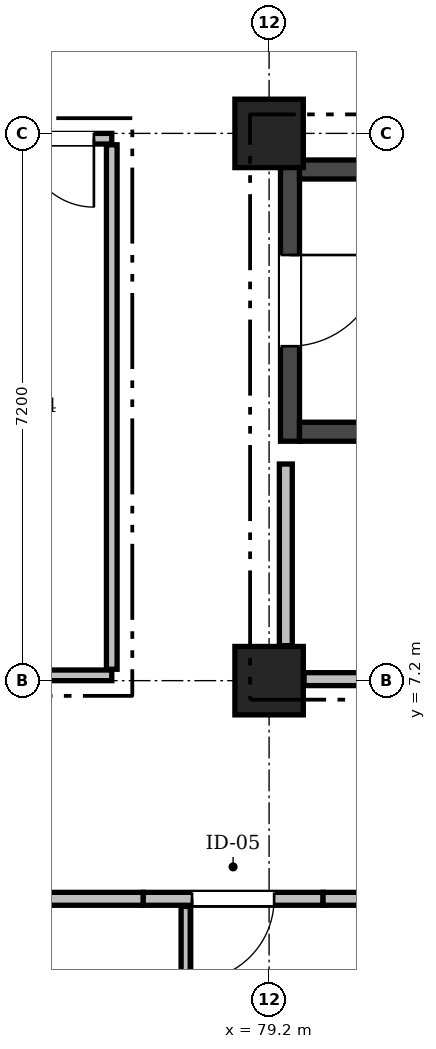
"""IFC4 building model, lengths in metres.
Left out: names, types, materials, properties, quantities, classifications, styles, units other than length and angle.
Written with IfcOpenShell. Run it as: python <this file> out.ifc"""

import sys

from ifc_helpers import new_model, si_unit, direction, frame, frame_2d, origin, origin_2d, place, context, subcontext, project, spatial, rectangle, extrude, element, fill, save


model = new_model("IFC4")
c1 = context("Model", 3, precision=1e-05, world=origin(), true_north=direction((0.0, 1.0)))
c2 = subcontext(c1, "Body", "Model", "MODEL_VIEW")
j1 = project(units=[si_unit("LENGTHUNIT", "METRE"), si_unit("PLANEANGLEUNIT", "RADIAN")], contexts=[c1])
p1 = place(None, origin())
s1 = spatial("IfcSite", under=j1, at=p1, CompositionType="ELEMENT")
p2 = place(p1, origin())
s2 = spatial("IfcBuilding", under=s1, at=p2, CompositionType="ELEMENT")
p3 = place(p2, frame((0.0, 0.0, 4.8)))
s3 = spatial("IfcBuildingStorey", under=s2, at=p3, CompositionType="ELEMENT", Elevation=4.8)
for number, where, z_axis, x_axis in (
    (1, (79.2, 7.2, 0.0), (0.0, 0.0, 1.0), (1.0, 0.0, 0.0)),
    (2, (79.2, 14.4, 0.0), (0.0, 0.0, 1.0), (1.0, 0.0, 0.0)),
):
    element("IfcColumn", number, at=place(p3, frame(where, z_axis=z_axis, x_axis=x_axis)), inside=s3, PredefinedType="COLUMN", context=c2, shape_type="SweptSolid", body=[
        extrude(rectangle(XDim=0.9, YDim=0.9, at=origin_2d()), origin(), (0.0, 0.0, 1.0), 4.8),
    ])
p4 = place(p3, frame((79.475, 10.35, 0.0), z_axis=(0.0, 0.0, 1.0), x_axis=(0.0, 1.0, 0.0)))
e3 = element("IfcWall", 3, at=p4, inside=s3, PredefinedType="SHEAR", context=c2, shape_type="SweptSolid", body=[
    extrude(rectangle(XDim=3.7, YDim=0.25, at=frame_2d((1.85, 0.0))), origin(), (0.0, 0.0, 1.0), 4.55),
])
p5 = place(p4, frame((1.25, 0.0, 0.0)))
e4 = element("IfcOpeningElement", 4, at=p5, cuts=e3, PredefinedType="OPENING", context=c2, shape_type="SweptSolid", body=[
    extrude(rectangle(XDim=1.2, YDim=2.15, at=frame_2d((0.6, 1.075))), frame((0.0, 0.137, 0.0), z_axis=(0.0, -1.0, 0.0), x_axis=(1.0, 0.0, 0.0)), (0.0, 0.0, 1.0), 0.274),
])
for number, where, z_axis, x_axis in (
    (5, (79.6, 10.475, 0.0), (0.0, 0.0, 1.0), (1.0, 0.0, 0.0)),
    (6, (79.6, 13.925, 0.0), (0.0, 0.0, 1.0), (1.0, 0.0, 0.0)),
):
    element("IfcWall", number, at=place(p3, frame(where, z_axis=z_axis, x_axis=x_axis)), inside=s3, PredefinedType="SHEAR", context=c2, shape_type="SweptSolid", body=[
        extrude(rectangle(XDim=7.6, YDim=0.25, at=frame_2d((3.8, 0.0))), origin(), (0.0, 0.0, 1.0), 4.55),
    ])
p6 = place(p3, frame((72.07, 7.27, 0.0), z_axis=(0.0, 0.0, 1.0), x_axis=(1.0, 0.0, 0.0)))
e7 = element("IfcWall", 7, at=p6, inside=s3, PredefinedType="PARTITIONING", context=c2, shape_type="SweptSolid", body=[
    extrude(rectangle(XDim=5.06, YDim=0.14, at=frame_2d((2.53, 0.0))), origin(), (0.0, 0.0, 1.0), 3.9),
])
p7 = place(p3, frame((72.07, 14.33, 0.0), z_axis=(0.0, 0.0, 1.0), x_axis=(1.0, 0.0, 0.0)))
e8 = element("IfcWall", 8, at=p7, inside=s3, PredefinedType="PARTITIONING", context=c2, shape_type="SweptSolid", body=[
    extrude(rectangle(XDim=5.06, YDim=0.14, at=frame_2d((2.53, 0.0))), origin(), (0.0, 0.0, 1.0), 3.9),
])
p8 = place(p7, frame((0.88, 0.0, 0.0)))
e9 = element("IfcOpeningElement", 9, at=p8, cuts=e8, PredefinedType="OPENING", context=c2, shape_type="SweptSolid", body=[
    extrude(rectangle(XDim=0.94, YDim=2.1, at=frame_2d((0.47, 1.05))), frame((0.0, 0.082, 0.0), z_axis=(0.0, -1.0, 0.0), x_axis=(1.0, 0.0, 0.0)), (0.0, 0.0, 1.0), 0.164),
])
p9 = place(p7, frame((2.415, 0.0, 0.0)))
e10 = element("IfcOpeningElement", 10, at=p9, cuts=e8, PredefinedType="OPENING", context=c2, shape_type="SweptSolid", body=[
    extrude(rectangle(XDim=0.9, YDim=2.08, at=frame_2d((0.45, 1.04))), frame((0.0, 0.082, 0.0), z_axis=(0.0, -1.0, 0.0), x_axis=(1.0, 0.0, 0.0)), (0.0, 0.0, 1.0), 0.164),
])
p10 = place(p7, frame((3.925, 0.0, 0.0)))
e11 = element("IfcOpeningElement", 11, at=p10, cuts=e8, PredefinedType="OPENING", context=c2, shape_type="SweptSolid", body=[
    extrude(rectangle(XDim=0.9, YDim=2.08, at=frame_2d((0.45, 1.04))), frame((0.0, 0.082, 0.0), z_axis=(0.0, -1.0, 0.0), x_axis=(1.0, 0.0, 0.0)), (0.0, 0.0, 1.0), 0.164),
])
p11 = place(p3, frame((77.13, 7.35, 0.0), z_axis=(0.0, 0.0, 1.0), x_axis=(0.0, 1.0, 0.0)))
e12 = element("IfcWall", 12, at=p11, inside=s3, PredefinedType="PARTITIONING", context=c2, shape_type="SweptSolid", body=[
    extrude(rectangle(XDim=6.9, YDim=0.14, at=frame_2d((3.45, 0.0))), origin(), (0.0, 0.0, 1.0), 4.46),
])
p12 = place(p3, frame((79.42, 7.66, 0.0), z_axis=(0.0, 0.0, 1.0), x_axis=(0.0, 1.0, 0.0)))
e13 = element("IfcWall", 13, at=p12, inside=s3, PredefinedType="PARTITIONING", context=c2, shape_type="SweptSolid", body=[
    extrude(rectangle(XDim=2.39, YDim=0.17, at=frame_2d((1.195, 0.0))), origin(), (0.0, 0.0, 1.0), 4.08),
])
p13 = place(p3, frame((77.542, 4.33, 0.0), z_axis=(0.0, 0.0, 1.0), x_axis=(1.0, 0.0, 0.0)))
e14 = element("IfcWall", 14, at=p13, inside=s3, PredefinedType="PARTITIONING", context=c2, shape_type="SweptSolid", body=[
    extrude(rectangle(XDim=2.368, YDim=0.17, at=frame_2d((1.184, 0.0))), origin(), (0.0, 0.0, 1.0), 4.46),
])
p14 = place(p13, frame((0.644, 0.0, 0.0)))
e15 = element("IfcOpeningElement", 15, at=p14, cuts=e14, PredefinedType="OPENING", context=c2, shape_type="SweptSolid", body=[
    extrude(rectangle(XDim=1.08, YDim=2.2, at=frame_2d((0.54, 1.1))), frame((0.0, 0.097, 0.0), z_axis=(0.0, -1.0, 0.0), x_axis=(1.0, 0.0, 0.0)), (0.0, 0.0, 1.0), 0.194),
])
p15 = place(p3, frame((79.66, 7.22, 0.0), z_axis=(0.0, 0.0, 1.0), x_axis=(1.0, 0.0, 0.0)))
e16 = element("IfcWall", 16, at=p15, inside=s3, PredefinedType="PARTITIONING", context=c2, shape_type="SweptSolid", body=[
    extrude(rectangle(XDim=6.28, YDim=0.17, at=frame_2d((3.14, 0.0))), origin(), (0.0, 0.0, 1.0), 3.9),
])
p16 = place(p15, frame((2.12, 0.0, 0.0)))
e17 = element("IfcOpeningElement", 17, at=p16, cuts=e16, PredefinedType="OPENING", context=c2, shape_type="SweptSolid", body=[
    extrude(rectangle(XDim=2.04, YDim=2.34, at=frame_2d((1.02, 1.17))), frame((0.0, 0.097, 0.0), z_axis=(0.0, -1.0, 0.0), x_axis=(1.0, 0.0, 0.0)), (0.0, 0.0, 1.0), 0.194),
])
p17 = place(p3, frame((79.91, 4.33, 0.0), z_axis=(0.0, 0.0, 1.0), x_axis=(1.0, 0.0, 0.0)))
e18 = element("IfcWall", 18, at=p17, inside=s3, PredefinedType="PARTITIONING", context=c2, shape_type="SweptSolid", body=[
    extrude(rectangle(XDim=16.328, YDim=0.17, at=frame_2d((8.164, 0.0))), origin(), (0.0, 0.0, 1.0), 4.46),
])
p18 = place(p17, frame((7.144, 0.0, 0.0)))
e19 = element("IfcOpeningElement", 19, at=p18, cuts=e18, PredefinedType="OPENING", context=c2, shape_type="SweptSolid", body=[
    extrude(rectangle(XDim=2.04, YDim=2.34, at=frame_2d((1.02, 1.17))), frame((0.0, 0.097, 0.0), z_axis=(0.0, -1.0, 0.0), x_axis=(1.0, 0.0, 0.0)), (0.0, 0.0, 1.0), 0.194),
])
p19 = place(p3, frame((61.098, 4.33, 0.0), z_axis=(0.0, 0.0, 1.0), x_axis=(1.0, 0.0, 0.0)))
e20 = element("IfcWall", 20, at=p19, inside=s3, PredefinedType="PARTITIONING", context=c2, shape_type="SweptSolid", body=[
    extrude(rectangle(XDim=16.444, YDim=0.17, at=frame_2d((8.222, 0.0))), origin(), (0.0, 0.0, 1.0), 4.46),
])
p20 = place(p19, frame((7.262, 0.0, 0.0)))
e21 = element("IfcOpeningElement", 21, at=p20, cuts=e20, PredefinedType="OPENING", context=c2, shape_type="SweptSolid", body=[
    extrude(rectangle(XDim=1.92, YDim=2.32, at=frame_2d((0.96, 1.16))), frame((0.0, 0.097, 0.0), z_axis=(0.0, -1.0, 0.0), x_axis=(1.0, 0.0, 0.0)), (0.0, 0.0, 1.0), 0.194),
])
p21 = place(p3, frame((78.102, 0.122, 0.0), z_axis=(0.0, 0.0, 1.0), x_axis=(0.0, 1.0, 0.0)))
e22 = element("IfcWall", 22, at=p21, inside=s3, PredefinedType="PARTITIONING", context=c2, shape_type="SweptSolid", body=[
    extrude(rectangle(XDim=4.108, YDim=0.12, at=frame_2d((2.054, 0.0))), origin(), (0.0, 0.0, 1.0), 4.46),
])
p22 = place(p5, frame((1.2, 0.0, 0.0), z_axis=(0.0, 0.0, 1.0), x_axis=(-1.0, 0.0, 0.0)))
e23 = element("IfcDoor", 23, at=p22, inside=s3, OperationType="SINGLE_SWING_LEFT", PredefinedType="DOOR", context=c2, shape_type="SweptSolid", body=[
    extrude(rectangle(XDim=1.2, YDim=2.15, at=frame_2d((0.6, 1.075))), frame((0.0, 0.025, 0.0), z_axis=(0.0, -1.0, 0.0), x_axis=(1.0, 0.0, 0.0)), (0.0, 0.0, 1.0), 0.05),
])
fill(e4, e23)
p23 = place(p10, frame((0.9, 0.0, 0.0), z_axis=(0.0, 0.0, 1.0), x_axis=(-1.0, 0.0, 0.0)))
e24 = element("IfcDoor", 24, at=p23, inside=s3, OperationType="SINGLE_SWING_LEFT", PredefinedType="DOOR", context=c2, shape_type="SweptSolid", body=[
    extrude(rectangle(XDim=0.9, YDim=2.08, at=frame_2d((0.45, 1.04))), frame((0.0, 0.025, 0.0), z_axis=(0.0, -1.0, 0.0), x_axis=(1.0, 0.0, 0.0)), (0.0, 0.0, 1.0), 0.05),
])
fill(e11, e24)
p24 = place(p14, frame((1.08, 0.0, 0.0), z_axis=(0.0, 0.0, 1.0), x_axis=(-1.0, 0.0, 0.0)))
e25 = element("IfcDoor", 25, at=p24, inside=s3, OperationType="SINGLE_SWING_RIGHT", PredefinedType="DOOR", context=c2, shape_type="SweptSolid", body=[
    extrude(rectangle(XDim=1.08, YDim=2.2, at=frame_2d((0.54, 1.1))), frame((0.0, 0.025, 0.0), z_axis=(0.0, -1.0, 0.0), x_axis=(1.0, 0.0, 0.0)), (0.0, 0.0, 1.0), 0.05),
])
fill(e15, e25)
save(model, sys.argv[1])
